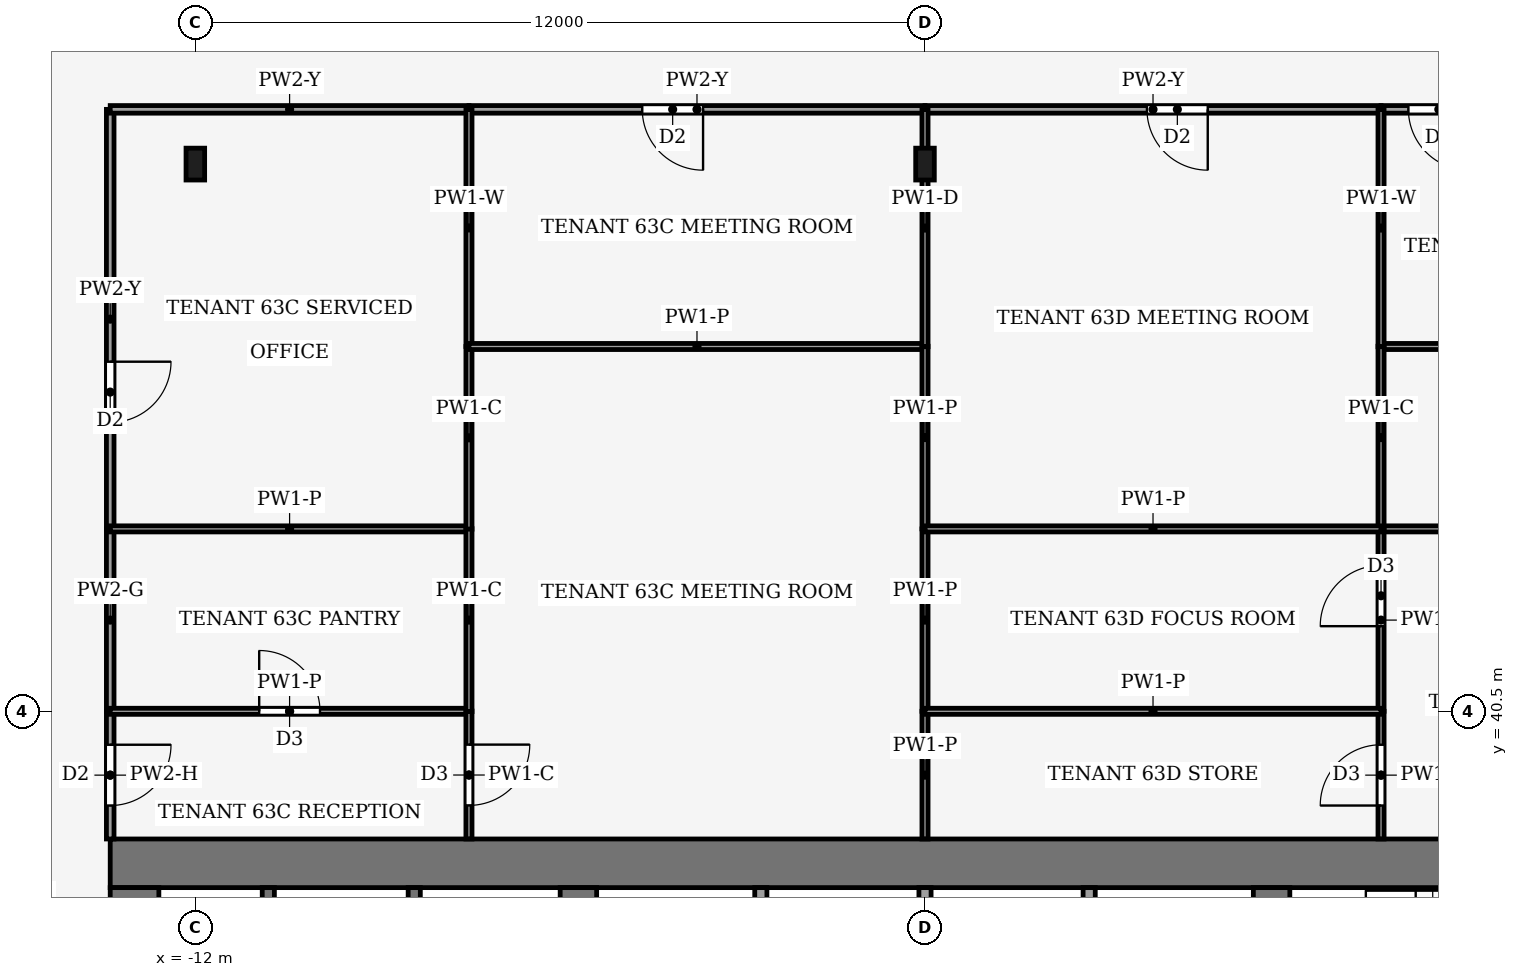
"""IFC4 building model, lengths in metres.
Left out: names, types, materials, properties, quantities, classifications, styles, units other than length and angle.
Written with IfcOpenShell. Run it as: python <this file> out.ifc"""

import sys

from ifc_helpers import new_model, si_unit, direction, frame, frame_2d, origin, origin_2d, place, context, subcontext, project, spatial, rectangle, i_section, extrude, element, fill, save


model = new_model("IFC4")
c1 = context("Model", 3, precision=1e-05, world=origin(), true_north=direction((0.0, 1.0)))
c2 = subcontext(c1, "Body", "Model", "MODEL_VIEW")
j1 = project(units=[si_unit("LENGTHUNIT", "METRE"), si_unit("PLANEANGLEUNIT", "RADIAN")], contexts=[c1])
p1 = place(None, origin())
s1 = spatial("IfcSite", under=j1, at=p1, CompositionType="ELEMENT")
p2 = place(p1, origin())
s2 = spatial("IfcBuilding", under=s1, at=p2, CompositionType="ELEMENT")
p3 = place(p2, frame((0.0, 0.0, 274.0)))
s3 = spatial("IfcBuildingStorey", under=s2, at=p3, CompositionType="ELEMENT", Elevation=274.0)
p4 = place(p3, frame((-13.4, 38.0, -0.13), z_axis=(0.0, 0.0, 1.0), x_axis=(1.0, 0.0, 0.0)))
e1 = element("IfcWall", 1, at=p4, inside=s3, PredefinedType="SHEAR", context=c2, shape_type="SweptSolid", body=[
    extrude(rectangle(XDim=26.8, YDim=0.8, at=frame_2d((13.4, 0.0))), origin(), (0.0, 0.0, 1.0), 4.0),
])
p5 = place(p3, frame((-13.0, 18.4, -0.13), z_axis=(0.0, 0.0, 1.0), x_axis=(0.0, 1.0, 0.0)))
e2 = element("IfcWall", 2, at=p5, inside=s3, PredefinedType="SHEAR", context=c2, shape_type="SweptSolid", body=[
    extrude(rectangle(XDim=19.2, YDim=0.8, at=frame_2d((9.6, 0.0))), origin(), (0.0, 0.0, 1.0), 4.0),
])
p6 = place(p5, frame((2.8, 0.0, 0.13)))
e3 = element("IfcOpeningElement", 3, at=p6, cuts=e2, PredefinedType="OPENING", context=c2, shape_type="SweptSolid", body=[
    extrude(rectangle(XDim=2.4, YDim=2.4, at=frame_2d((1.2, 1.2))), frame((0.0, 0.41, 0.0), z_axis=(0.0, -1.0, 0.0), x_axis=(1.0, 0.0, 0.0)), (0.0, 0.0, 1.0), 0.82),
])
p7 = place(p5, frame((13.4, 0.0, 0.13)))
e4 = element("IfcOpeningElement", 4, at=p7, cuts=e2, PredefinedType="OPENING", context=c2, shape_type="SweptSolid", body=[
    extrude(rectangle(XDim=1.4, YDim=2.2, at=frame_2d((0.7, 1.1))), frame((0.0, 0.41, 0.0), z_axis=(0.0, -1.0, 0.0), x_axis=(1.0, 0.0, 0.0)), (0.0, 0.0, 1.0), 0.82),
])
p8 = place(p3, frame((-5.7, 18.4, -0.13), z_axis=(0.0, 0.0, 1.0), x_axis=(0.0, 1.0, 0.0)))
e5 = element("IfcWall", 5, at=p8, inside=s3, PredefinedType="SHEAR", context=c2, shape_type="SweptSolid", body=[
    extrude(rectangle(XDim=19.2, YDim=0.6, at=frame_2d((9.6, 0.0))), origin(), (0.0, 0.0, 1.0), 4.0),
])
p9 = place(p8, frame((8.35, 0.0, 0.13)))
e6 = element("IfcOpeningElement", 6, at=p9, cuts=e5, PredefinedType="OPENING", context=c2, shape_type="SweptSolid", body=[
    extrude(rectangle(XDim=0.9, YDim=2.1, at=frame_2d((0.45, 1.05))), frame((0.0, 0.31, 0.0), z_axis=(0.0, -1.0, 0.0), x_axis=(1.0, 0.0, 0.0)), (0.0, 0.0, 1.0), 0.62),
])
p10 = place(p3, frame((5.7, 18.4, -0.13), z_axis=(0.0, 0.0, 1.0), x_axis=(0.0, 1.0, 0.0)))
e7 = element("IfcWall", 7, at=p10, inside=s3, PredefinedType="SHEAR", context=c2, shape_type="SweptSolid", body=[
    extrude(rectangle(XDim=19.2, YDim=0.6, at=frame_2d((9.6, 0.0))), origin(), (0.0, 0.0, 1.0), 4.0),
])
p11 = place(p10, frame((8.35, 0.0, 0.13)))
e8 = element("IfcOpeningElement", 8, at=p11, cuts=e7, PredefinedType="OPENING", context=c2, shape_type="SweptSolid", body=[
    extrude(rectangle(XDim=0.9, YDim=2.1, at=frame_2d((0.45, 1.05))), frame((0.0, 0.31, 0.0), z_axis=(0.0, -1.0, 0.0), x_axis=(1.0, 0.0, 0.0)), (0.0, 0.0, 1.0), 0.62),
])
p12 = place(p10, frame((13.3, 0.0, 0.13)))
e9 = element("IfcOpeningElement", 9, at=p12, cuts=e7, PredefinedType="OPENING", context=c2, shape_type="SweptSolid", body=[
    extrude(rectangle(XDim=2.4, YDim=2.4, at=frame_2d((1.2, 1.2))), frame((0.0, 0.31, 0.0), z_axis=(0.0, -1.0, 0.0), x_axis=(1.0, 0.0, 0.0)), (0.0, 0.0, 1.0), 0.62),
])
for number, where, z_axis, x_axis in (
    (10, (-12.0, 49.5, 0.0), (0.0, 0.0, 1.0), (1.0, 0.0, 0.0)),
    (11, (0.0, 49.5, 0.0), (0.0, 0.0, 1.0), (1.0, 0.0, 0.0)),
):
    element("IfcColumn", number, at=place(p3, frame(where, z_axis=z_axis, x_axis=x_axis)), inside=s3, PredefinedType="COLUMN", context=c2, shape_type="SweptSolid", body=[
        extrude(i_section(OverallWidth=0.306, OverallDepth=0.524, WebThickness=0.012, FlangeThickness=0.04, FilletRadius=0.027, at=origin_2d()), origin(), (0.0, 0.0, 1.0), 4.0),
    ])
for number, where, z_axis, x_axis in (
    (12, (-10.8, 34.0, 0.0), (0.0, 0.0, 1.0), (0.0, 1.0, 0.0)),
    (13, (-8.4, 34.0, 0.0), (0.0, 0.0, 1.0), (0.0, 1.0, 0.0)),
    (14, (-2.7, 34.0, 0.0), (0.0, 0.0, 1.0), (0.0, 1.0, 0.0)),
    (15, (0.0, 34.0, 0.0), (0.0, 0.0, 1.0), (0.0, 1.0, 0.0)),
    (16, (2.7, 34.0, 0.0), (0.0, 0.0, 1.0), (0.0, 1.0, 0.0)),
):
    element("IfcWall", number, at=place(p3, frame(where, z_axis=z_axis, x_axis=x_axis)), inside=s3, PredefinedType="PARTITIONING", context=c2, shape_type="SweptSolid", body=[
        extrude(rectangle(XDim=3.6, YDim=0.2, at=frame_2d((1.8, 0.0))), origin(), (0.0, 0.0, 1.0), 3.87),
    ])
p13 = place(p3, frame((-13.4, 40.5, 0.0), z_axis=(0.0, 0.0, 1.0), x_axis=(0.0, -1.0, 0.0)))
e17 = element("IfcWall", 17, at=p13, inside=s3, PredefinedType="PARTITIONING", context=c2, shape_type="SweptSolid", body=[
    extrude(rectangle(XDim=2.1, YDim=0.125, at=frame_2d((1.05, 0.0))), origin(), (0.0, 0.0, 1.0), 3.14),
])
p14 = place(p13, frame((0.55, 0.0, 0.0)))
e18 = element("IfcOpeningElement", 18, at=p14, cuts=e17, PredefinedType="OPENING", context=c2, shape_type="SweptSolid", body=[
    extrude(rectangle(XDim=1.0, YDim=2.1, at=frame_2d((0.5, 1.05))), frame((0.0, 0.073, 0.0), z_axis=(0.0, -1.0, 0.0), x_axis=(1.0, 0.0, 0.0)), (0.0, 0.0, 1.0), 0.145),
])
p15 = place(p3, frame((-13.4, 40.5, 0.0), z_axis=(0.0, 0.0, 1.0), x_axis=(0.0, 1.0, 0.0)))
e19 = element("IfcWall", 19, at=p15, inside=s3, PredefinedType="PARTITIONING", context=c2, shape_type="SweptSolid", body=[
    extrude(rectangle(XDim=3.0, YDim=0.125, at=frame_2d((1.5, 0.0))), origin(), (0.0, 0.0, 1.0), 3.87),
])
p16 = place(p3, frame((-13.4, 50.4, 0.0), z_axis=(0.0, 0.0, 1.0), x_axis=(0.0, -1.0, 0.0)))
e20 = element("IfcWall", 20, at=p16, inside=s3, PredefinedType="PARTITIONING", context=c2, shape_type="SweptSolid", body=[
    extrude(rectangle(XDim=6.9, YDim=0.125, at=frame_2d((3.45, 0.0))), origin(), (0.0, 0.0, 1.0), 3.24),
])
p17 = place(p16, frame((4.15, 0.0, 0.0)))
e21 = element("IfcOpeningElement", 21, at=p17, cuts=e20, PredefinedType="OPENING", context=c2, shape_type="SweptSolid", body=[
    extrude(rectangle(XDim=1.0, YDim=2.1, at=frame_2d((0.5, 1.05))), frame((0.0, 0.073, 0.0), z_axis=(0.0, -1.0, 0.0), x_axis=(1.0, 0.0, 0.0)), (0.0, 0.0, 1.0), 0.145),
])
p18 = place(p3, frame((-7.5, 50.4, 0.0), z_axis=(0.0, 0.0, 1.0), x_axis=(-1.0, 0.0, 0.0)))
e22 = element("IfcWall", 22, at=p18, inside=s3, PredefinedType="PARTITIONING", context=c2, shape_type="SweptSolid", body=[
    extrude(rectangle(XDim=5.9, YDim=0.125, at=frame_2d((2.95, 0.0))), origin(), (0.0, 0.0, 1.0), 3.24),
])
p19 = place(p3, frame((0.0, 50.4, 0.0), z_axis=(0.0, 0.0, 1.0), x_axis=(-1.0, 0.0, 0.0)))
e23 = element("IfcWall", 23, at=p19, inside=s3, PredefinedType="PARTITIONING", context=c2, shape_type="SweptSolid", body=[
    extrude(rectangle(XDim=7.5, YDim=0.125, at=frame_2d((3.75, 0.0))), origin(), (0.0, 0.0, 1.0), 3.24),
])
p20 = place(p19, frame((3.65, 0.0, 0.0)))
e24 = element("IfcOpeningElement", 24, at=p20, cuts=e23, PredefinedType="OPENING", context=c2, shape_type="SweptSolid", body=[
    extrude(rectangle(XDim=1.0, YDim=2.1, at=frame_2d((0.5, 1.05))), frame((0.0, 0.073, 0.0), z_axis=(0.0, -1.0, 0.0), x_axis=(1.0, 0.0, 0.0)), (0.0, 0.0, 1.0), 0.145),
])
p21 = place(p3, frame((13.4, 50.4, 0.0), z_axis=(0.0, 0.0, 1.0), x_axis=(-1.0, 0.0, 0.0)))
e25 = element("IfcWall", 25, at=p21, inside=s3, PredefinedType="PARTITIONING", context=c2, shape_type="SweptSolid", body=[
    extrude(rectangle(XDim=5.9, YDim=0.125, at=frame_2d((2.95, 0.0))), origin(), (0.0, 0.0, 1.0), 3.24),
])
p22 = place(p21, frame((4.45, 0.0, 0.0)))
e26 = element("IfcOpeningElement", 26, at=p22, cuts=e25, PredefinedType="OPENING", context=c2, shape_type="SweptSolid", body=[
    extrude(rectangle(XDim=1.0, YDim=2.1, at=frame_2d((0.5, 1.05))), frame((0.0, 0.073, 0.0), z_axis=(0.0, -1.0, 0.0), x_axis=(1.0, 0.0, 0.0)), (0.0, 0.0, 1.0), 0.145),
])
p23 = place(p3, frame((7.5, 50.4, 0.0), z_axis=(0.0, 0.0, 1.0), x_axis=(-1.0, 0.0, 0.0)))
e27 = element("IfcWall", 27, at=p23, inside=s3, PredefinedType="PARTITIONING", context=c2, shape_type="SweptSolid", body=[
    extrude(rectangle(XDim=7.5, YDim=0.125, at=frame_2d((3.75, 0.0))), origin(), (0.0, 0.0, 1.0), 3.24),
])
p24 = place(p23, frame((2.85, 0.0, 0.0)))
e28 = element("IfcOpeningElement", 28, at=p24, cuts=e27, PredefinedType="OPENING", context=c2, shape_type="SweptSolid", body=[
    extrude(rectangle(XDim=1.0, YDim=2.1, at=frame_2d((0.5, 1.05))), frame((0.0, 0.073, 0.0), z_axis=(0.0, -1.0, 0.0), x_axis=(1.0, 0.0, 0.0)), (0.0, 0.0, 1.0), 0.145),
])
p25 = place(p3, frame((-13.4, 40.5, 0.0), z_axis=(0.0, 0.0, 1.0), x_axis=(1.0, 0.0, 0.0)))
e29 = element("IfcWall", 29, at=p25, inside=s3, PredefinedType="PARTITIONING", context=c2, shape_type="SweptSolid", body=[
    extrude(rectangle(XDim=5.9, YDim=0.1, at=frame_2d((2.95, 0.0))), origin(), (0.0, 0.0, 1.0), 3.44),
])
p26 = place(p25, frame((2.45, 0.0, 0.0)))
e30 = element("IfcOpeningElement", 30, at=p26, cuts=e29, PredefinedType="OPENING", context=c2, shape_type="SweptSolid", body=[
    extrude(rectangle(XDim=1.0, YDim=2.1, at=frame_2d((0.5, 1.05))), frame((0.0, 0.06, 0.0), z_axis=(0.0, -1.0, 0.0), x_axis=(1.0, 0.0, 0.0)), (0.0, 0.0, 1.0), 0.12),
])
p27 = place(p3, frame((-7.5, 40.504, 0.0), z_axis=(0.0, 0.0, 1.0), x_axis=(0.0, -1.0, 0.0)))
e31 = element("IfcWall", 31, at=p27, inside=s3, PredefinedType="PARTITIONING", context=c2, shape_type="SweptSolid", body=[
    extrude(rectangle(XDim=2.104, YDim=0.1, at=frame_2d((1.052, 0.0))), origin(), (0.0, 0.0, 1.0), 3.87),
])
p28 = place(p27, frame((0.552, 0.0, 0.0)))
e32 = element("IfcOpeningElement", 32, at=p28, cuts=e31, PredefinedType="OPENING", context=c2, shape_type="SweptSolid", body=[
    extrude(rectangle(XDim=1.0, YDim=2.1, at=frame_2d((0.5, 1.05))), frame((0.0, 0.06, 0.0), z_axis=(0.0, -1.0, 0.0), x_axis=(1.0, 0.0, 0.0)), (0.0, 0.0, 1.0), 0.12),
])
p29 = place(p3, frame((-7.5, 43.5, 0.0), z_axis=(0.0, 0.0, 1.0), x_axis=(-1.0, 0.0, 0.0)))
e33 = element("IfcWall", 33, at=p29, inside=s3, PredefinedType="PARTITIONING", context=c2, shape_type="SweptSolid", body=[
    extrude(rectangle(XDim=5.9, YDim=0.1, at=frame_2d((2.95, 0.0))), origin(), (0.0, 0.0, 1.0), 3.44),
])
p30 = place(p3, frame((-7.5, 40.496, 0.0), z_axis=(0.0, 0.0, 1.0), x_axis=(0.0, 1.0, 0.0)))
e34 = element("IfcWall", 34, at=p30, inside=s3, PredefinedType="PARTITIONING", context=c2, shape_type="SweptSolid", body=[
    extrude(rectangle(XDim=3.008, YDim=0.1, at=frame_2d((1.504, 0.0))), origin(), (0.0, 0.0, 1.0), 3.87),
])
p31 = place(p3, frame((-7.5, 43.496, 0.0), z_axis=(0.0, 0.0, 1.0), x_axis=(0.0, 1.0, 0.0)))
e35 = element("IfcWall", 35, at=p31, inside=s3, PredefinedType="PARTITIONING", context=c2, shape_type="SweptSolid", body=[
    extrude(rectangle(XDim=3.004, YDim=0.1, at=frame_2d((1.502, 0.0))), origin(), (0.0, 0.0, 1.0), 3.87),
])
p32 = place(p3, frame((-7.5, 46.5, 0.0), z_axis=(0.0, 0.0, 1.0), x_axis=(0.0, 1.0, 0.0)))
e36 = element("IfcWall", 36, at=p32, inside=s3, PredefinedType="PARTITIONING", context=c2, shape_type="SweptSolid", body=[
    extrude(rectangle(XDim=3.9, YDim=0.1, at=frame_2d((1.95, 0.0))), origin(), (0.0, 0.0, 1.0), 3.24),
])
p33 = place(p3, frame((0.0, 46.5, 0.0), z_axis=(0.0, 0.0, 1.0), x_axis=(-1.0, 0.0, 0.0)))
e37 = element("IfcWall", 37, at=p33, inside=s3, PredefinedType="PARTITIONING", context=c2, shape_type="SweptSolid", body=[
    extrude(rectangle(XDim=7.5, YDim=0.1, at=frame_2d((3.75, 0.0))), origin(), (0.0, 0.0, 1.0), 3.44),
])
p34 = place(p3, frame((0.0, 38.4, 0.0), z_axis=(0.0, 0.0, 1.0), x_axis=(0.0, 1.0, 0.0)))
e38 = element("IfcWall", 38, at=p34, inside=s3, PredefinedType="PARTITIONING", context=c2, shape_type="SweptSolid", body=[
    extrude(rectangle(XDim=2.1, YDim=0.1, at=frame_2d((1.05, 0.0))), origin(), (0.0, 0.0, 1.0), 3.44),
])
p35 = place(p3, frame((0.0, 40.5, 0.0), z_axis=(0.0, 0.0, 1.0), x_axis=(0.0, 1.0, 0.0)))
e39 = element("IfcWall", 39, at=p35, inside=s3, PredefinedType="PARTITIONING", context=c2, shape_type="SweptSolid", body=[
    extrude(rectangle(XDim=3.0, YDim=0.1, at=frame_2d((1.5, 0.0))), origin(), (0.0, 0.0, 1.0), 3.44),
])
p36 = place(p3, frame((0.0, 43.5, 0.0), z_axis=(0.0, 0.0, 1.0), x_axis=(0.0, 1.0, 0.0)))
e40 = element("IfcWall", 40, at=p36, inside=s3, PredefinedType="PARTITIONING", context=c2, shape_type="SweptSolid", body=[
    extrude(rectangle(XDim=3.004, YDim=0.1, at=frame_2d((1.502, 0.0))), origin(), (0.0, 0.0, 1.0), 3.44),
])
p37 = place(p3, frame((0.0, 46.496, 0.0), z_axis=(0.0, 0.0, 1.0), x_axis=(0.0, 1.0, 0.0)))
e41 = element("IfcWall", 41, at=p37, inside=s3, PredefinedType="PARTITIONING", context=c2, shape_type="SweptSolid", body=[
    extrude(rectangle(XDim=3.904, YDim=0.1, at=frame_2d((1.952, 0.0))), origin(), (0.0, 0.0, 1.0), 3.29),
])
p38 = place(p3, frame((7.5, 43.5, 0.0), z_axis=(0.0, 0.0, 1.0), x_axis=(1.0, 0.0, 0.0)))
e42 = element("IfcWall", 42, at=p38, inside=s3, PredefinedType="PARTITIONING", context=c2, shape_type="SweptSolid", body=[
    extrude(rectangle(XDim=5.9, YDim=0.1, at=frame_2d((2.95, 0.0))), origin(), (0.0, 0.0, 1.0), 3.44),
])
p39 = place(p38, frame((2.45, 0.0, 0.0)))
e43 = element("IfcOpeningElement", 43, at=p39, cuts=e42, PredefinedType="OPENING", context=c2, shape_type="SweptSolid", body=[
    extrude(rectangle(XDim=1.0, YDim=2.1, at=frame_2d((0.5, 1.05))), frame((0.0, 0.06, 0.0), z_axis=(0.0, -1.0, 0.0), x_axis=(1.0, 0.0, 0.0)), (0.0, 0.0, 1.0), 0.12),
])
p40 = place(p3, frame((7.5, 38.4, 0.0), z_axis=(0.0, 0.0, 1.0), x_axis=(0.0, 1.0, 0.0)))
e44 = element("IfcWall", 44, at=p40, inside=s3, PredefinedType="PARTITIONING", context=c2, shape_type="SweptSolid", body=[
    extrude(rectangle(XDim=2.1, YDim=0.1, at=frame_2d((1.05, 0.0))), origin(), (0.0, 0.0, 1.0), 3.87),
])
p41 = place(p40, frame((0.55, 0.0, 0.0)))
e45 = element("IfcOpeningElement", 45, at=p41, cuts=e44, PredefinedType="OPENING", context=c2, shape_type="SweptSolid", body=[
    extrude(rectangle(XDim=1.0, YDim=2.1, at=frame_2d((0.5, 1.05))), frame((0.0, 0.06, 0.0), z_axis=(0.0, -1.0, 0.0), x_axis=(1.0, 0.0, 0.0)), (0.0, 0.0, 1.0), 0.12),
])
p42 = place(p3, frame((7.5, 40.5, 0.0), z_axis=(0.0, 0.0, 1.0), x_axis=(0.0, 1.0, 0.0)))
e46 = element("IfcWall", 46, at=p42, inside=s3, PredefinedType="PARTITIONING", context=c2, shape_type="SweptSolid", body=[
    extrude(rectangle(XDim=3.0, YDim=0.1, at=frame_2d((1.5, 0.0))), origin(), (0.0, 0.0, 1.0), 3.87),
])
p43 = place(p42, frame((1.4, 0.0, 0.0)))
e47 = element("IfcOpeningElement", 47, at=p43, cuts=e46, PredefinedType="OPENING", context=c2, shape_type="SweptSolid", body=[
    extrude(rectangle(XDim=1.0, YDim=2.1, at=frame_2d((0.5, 1.05))), frame((0.0, 0.06, 0.0), z_axis=(0.0, -1.0, 0.0), x_axis=(1.0, 0.0, 0.0)), (0.0, 0.0, 1.0), 0.12),
])
p44 = place(p3, frame((13.4, 46.5, 0.0), z_axis=(0.0, 0.0, 1.0), x_axis=(-1.0, 0.0, 0.0)))
e48 = element("IfcWall", 48, at=p44, inside=s3, PredefinedType="PARTITIONING", context=c2, shape_type="SweptSolid", body=[
    extrude(rectangle(XDim=5.9, YDim=0.1, at=frame_2d((2.95, 0.0))), origin(), (0.0, 0.0, 1.0), 3.44),
])
p45 = place(p3, frame((7.5, 46.504, 0.0), z_axis=(0.0, 0.0, 1.0), x_axis=(0.0, -1.0, 0.0)))
e49 = element("IfcWall", 49, at=p45, inside=s3, PredefinedType="PARTITIONING", context=c2, shape_type="SweptSolid", body=[
    extrude(rectangle(XDim=3.004, YDim=0.1, at=frame_2d((1.502, 0.0))), origin(), (0.0, 0.0, 1.0), 3.87),
])
p46 = place(p3, frame((7.5, 50.4, 0.0), z_axis=(0.0, 0.0, 1.0), x_axis=(0.0, -1.0, 0.0)))
e50 = element("IfcWall", 50, at=p46, inside=s3, PredefinedType="PARTITIONING", context=c2, shape_type="SweptSolid", body=[
    extrude(rectangle(XDim=3.904, YDim=0.1, at=frame_2d((1.952, 0.0))), origin(), (0.0, 0.0, 1.0), 3.24),
])
for number, where, z_axis, x_axis in (
    (51, (7.5, 40.5, 0.0), (0.0, 0.0, 1.0), (-1.0, 0.0, 0.0)),
    (52, (7.5, 43.5, 0.0), (0.0, 0.0, 1.0), (-1.0, 0.0, 0.0)),
):
    element("IfcWall", number, at=place(p3, frame(where, z_axis=z_axis, x_axis=x_axis)), inside=s3, PredefinedType="PARTITIONING", context=c2, shape_type="SweptSolid", body=[
        extrude(rectangle(XDim=7.5, YDim=0.1, at=frame_2d((3.75, 0.0))), origin(), (0.0, 0.0, 1.0), 3.44),
    ])
p47 = place(p14, origin())
e53 = element("IfcDoor", 53, at=p47, inside=s3, OperationType="SINGLE_SWING_LEFT", PredefinedType="DOOR", context=c2, shape_type="SweptSolid", body=[
    extrude(rectangle(XDim=1.0, YDim=2.1, at=frame_2d((0.5, 1.05))), frame((0.0, 0.025, 0.0), z_axis=(0.0, -1.0, 0.0), x_axis=(1.0, 0.0, 0.0)), (0.0, 0.0, 1.0), 0.05),
])
fill(e18, e53)
p48 = place(p17, origin())
e54 = element("IfcDoor", 54, at=p48, inside=s3, OperationType="SINGLE_SWING_RIGHT", PredefinedType="DOOR", context=c2, shape_type="SweptSolid", body=[
    extrude(rectangle(XDim=1.0, YDim=2.1, at=frame_2d((0.5, 1.05))), frame((0.0, 0.025, 0.0), z_axis=(0.0, -1.0, 0.0), x_axis=(1.0, 0.0, 0.0)), (0.0, 0.0, 1.0), 0.05),
])
fill(e21, e54)
p49 = place(p20, origin())
e55 = element("IfcDoor", 55, at=p49, inside=s3, OperationType="SINGLE_SWING_RIGHT", PredefinedType="DOOR", context=c2, shape_type="SweptSolid", body=[
    extrude(rectangle(XDim=1.0, YDim=2.1, at=frame_2d((0.5, 1.05))), frame((0.0, 0.025, 0.0), z_axis=(0.0, -1.0, 0.0), x_axis=(1.0, 0.0, 0.0)), (0.0, 0.0, 1.0), 0.05),
])
fill(e24, e55)
p50 = place(p22, origin())
e56 = element("IfcDoor", 56, at=p50, inside=s3, OperationType="SINGLE_SWING_RIGHT", PredefinedType="DOOR", context=c2, shape_type="SweptSolid", body=[
    extrude(rectangle(XDim=1.0, YDim=2.1, at=frame_2d((0.5, 1.05))), frame((0.0, 0.025, 0.0), z_axis=(0.0, -1.0, 0.0), x_axis=(1.0, 0.0, 0.0)), (0.0, 0.0, 1.0), 0.05),
])
fill(e26, e56)
p51 = place(p24, origin())
e57 = element("IfcDoor", 57, at=p51, inside=s3, OperationType="SINGLE_SWING_LEFT", PredefinedType="DOOR", context=c2, shape_type="SweptSolid", body=[
    extrude(rectangle(XDim=1.0, YDim=2.1, at=frame_2d((0.5, 1.05))), frame((0.0, 0.025, 0.0), z_axis=(0.0, -1.0, 0.0), x_axis=(1.0, 0.0, 0.0)), (0.0, 0.0, 1.0), 0.05),
])
fill(e28, e57)
p52 = place(p26, origin())
e58 = element("IfcDoor", 58, at=p52, inside=s3, OperationType="SINGLE_SWING_LEFT", PredefinedType="DOOR", context=c2, shape_type="SweptSolid", body=[
    extrude(rectangle(XDim=1.0, YDim=2.1, at=frame_2d((0.5, 1.05))), frame((0.0, 0.025, 0.0), z_axis=(0.0, -1.0, 0.0), x_axis=(1.0, 0.0, 0.0)), (0.0, 0.0, 1.0), 0.05),
])
fill(e30, e58)
p53 = place(p28, origin())
e59 = element("IfcDoor", 59, at=p53, inside=s3, OperationType="SINGLE_SWING_RIGHT", PredefinedType="DOOR", context=c2, shape_type="SweptSolid", body=[
    extrude(rectangle(XDim=1.0, YDim=2.1, at=frame_2d((0.5, 1.05))), frame((0.0, 0.025, 0.0), z_axis=(0.0, -1.0, 0.0), x_axis=(1.0, 0.0, 0.0)), (0.0, 0.0, 1.0), 0.05),
])
fill(e32, e59)
p54 = place(p41, origin())
e60 = element("IfcDoor", 60, at=p54, inside=s3, OperationType="SINGLE_SWING_RIGHT", PredefinedType="DOOR", context=c2, shape_type="SweptSolid", body=[
    extrude(rectangle(XDim=1.0, YDim=2.1, at=frame_2d((0.5, 1.05))), frame((0.0, 0.025, 0.0), z_axis=(0.0, -1.0, 0.0), x_axis=(1.0, 0.0, 0.0)), (0.0, 0.0, 1.0), 0.05),
])
fill(e45, e60)
p55 = place(p43, origin())
e61 = element("IfcDoor", 61, at=p55, inside=s3, OperationType="SINGLE_SWING_RIGHT", PredefinedType="DOOR", context=c2, shape_type="SweptSolid", body=[
    extrude(rectangle(XDim=1.0, YDim=2.1, at=frame_2d((0.5, 1.05))), frame((0.0, 0.025, 0.0), z_axis=(0.0, -1.0, 0.0), x_axis=(1.0, 0.0, 0.0)), (0.0, 0.0, 1.0), 0.05),
])
fill(e47, e61)
save(model, sys.argv[1])
